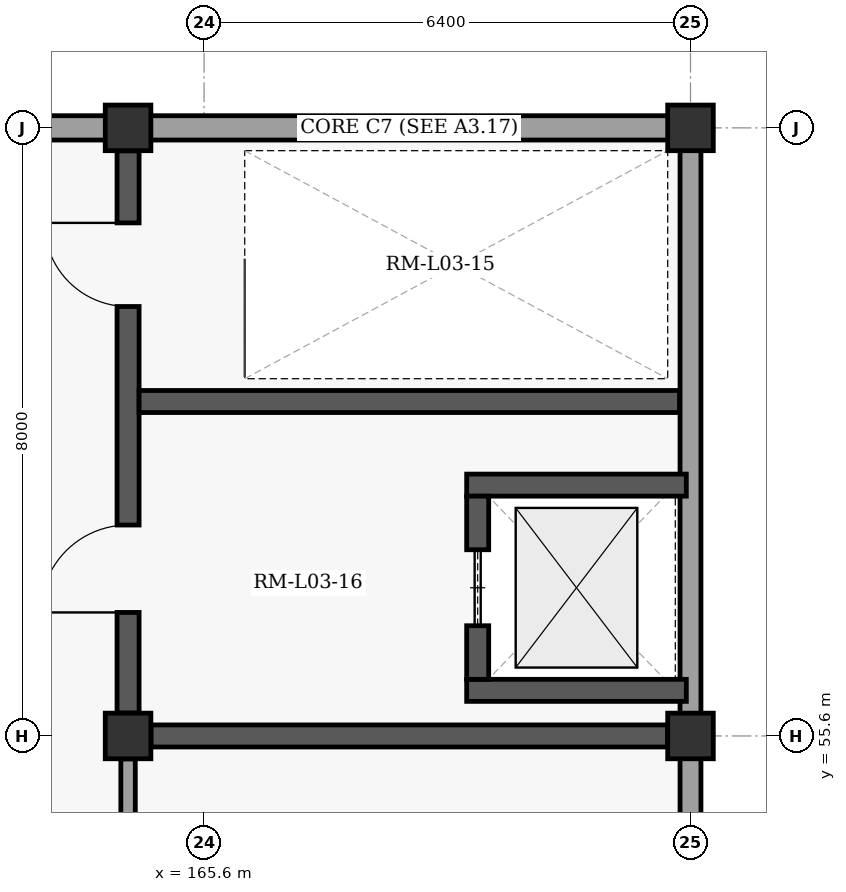
"""IFC4 building model, lengths in metres.
Left out: names, types, materials, properties, quantities, classifications, styles, units other than length and angle.
Written with IfcOpenShell. Run it as: python <this file> out.ifc"""

import sys

from ifc_helpers import new_model, si_unit, direction, frame, frame_2d, origin, origin_2d, place, context, subcontext, project, spatial, rectangle, extrude, element, fill, save


model = new_model("IFC4")
c1 = context("Model", 3, precision=1e-05, world=origin(), true_north=direction((0.0, 1.0)))
c2 = subcontext(c1, "Body", "Model", "MODEL_VIEW")
j1 = project(units=[si_unit("LENGTHUNIT", "METRE"), si_unit("PLANEANGLEUNIT", "RADIAN")], contexts=[c1])
p1 = place(None, origin())
s1 = spatial("IfcSite", under=j1, at=p1, CompositionType="ELEMENT")
p2 = place(p1, origin())
s2 = spatial("IfcBuilding", under=s1, at=p2, CompositionType="ELEMENT")
p3 = place(p2, frame((0.0, 0.0, 15.6)))
s3 = spatial("IfcBuildingStorey", under=s2, at=p3, CompositionType="ELEMENT", Elevation=15.6)
for number, where, z_axis, x_axis in (
    (1, (164.6, 55.6, 0.0), (0.0, 0.0, 1.0), (1.0, 0.0, 0.0)),
    (2, (164.6, 63.6, 0.0), (0.0, 0.0, 1.0), (1.0, 0.0, 0.0)),
    (3, (172.0, 55.6, 0.0), (0.0, 0.0, 1.0), (1.0, 0.0, 0.0)),
    (4, (172.0, 63.6, 0.0), (0.0, 0.0, 1.0), (1.0, 0.0, 0.0)),
):
    element("IfcColumn", number, at=place(p3, frame(where, z_axis=z_axis, x_axis=x_axis)), inside=s3, PredefinedType="COLUMN", context=c2, shape_type="SweptSolid", body=[
        extrude(rectangle(XDim=0.6, YDim=0.6, at=origin_2d()), origin(), (0.0, 0.0, 1.0), 4.8),
    ])
p4 = place(p3, frame((149.2, 63.6, 0.0), z_axis=(0.0, 0.0, 1.0), x_axis=(1.0, 0.0, 0.0)))
e5 = element("IfcWall", 5, at=p4, inside=s3, PredefinedType="SOLIDWALL", context=c2, shape_type="SweptSolid", body=[
    extrude(rectangle(XDim=22.8, YDim=0.32, at=frame_2d((11.4, 0.0))), origin(), (0.0, 0.0, 1.0), 3.705),
])
p5 = place(p4, frame((2.2, 0.0, 0.9)))
e6 = element("IfcOpeningElement", 6, at=p5, cuts=e5, PredefinedType="OPENING", context=c2, shape_type="SweptSolid", body=[
    extrude(rectangle(XDim=1.6, YDim=1.65, at=frame_2d((0.8, 0.825))), frame((0.0, 0.17, 0.0), z_axis=(0.0, -1.0, 0.0), x_axis=(1.0, 0.0, 0.0)), (0.0, 0.0, 1.0), 0.34),
])
p6 = place(p4, frame((8.6, 0.0, 0.9)))
e7 = element("IfcOpeningElement", 7, at=p6, cuts=e5, PredefinedType="OPENING", context=c2, shape_type="SweptSolid", body=[
    extrude(rectangle(XDim=1.6, YDim=1.65, at=frame_2d((0.8, 0.825))), frame((0.0, 0.17, 0.0), z_axis=(0.0, -1.0, 0.0), x_axis=(1.0, 0.0, 0.0)), (0.0, 0.0, 1.0), 0.34),
])
p7 = place(p3, frame((172.0, 63.6, 0.0), z_axis=(0.0, 0.0, 1.0), x_axis=(0.0, -1.0, 0.0)))
e8 = element("IfcWall", 8, at=p7, inside=s3, PredefinedType="SOLIDWALL", context=c2, shape_type="SweptSolid", body=[
    extrude(rectangle(XDim=56.0, YDim=0.275, at=frame_2d((28.0, 0.0))), origin(), (0.0, 0.0, 1.0), 3.705),
])
p8 = place(p7, frame((10.933, 0.0, 0.8)))
e9 = element("IfcOpeningElement", 9, at=p8, cuts=e8, PredefinedType="OPENING", context=c2, shape_type="SweptSolid", body=[
    extrude(rectangle(XDim=1.6, YDim=1.65, at=frame_2d((0.8, 0.825))), frame((0.0, 0.147, 0.0), z_axis=(0.0, -1.0, 0.0), x_axis=(1.0, 0.0, 0.0)), (0.0, 0.0, 1.0), 0.295),
])
p9 = place(p7, frame((19.667, 0.0, 0.8)))
e10 = element("IfcOpeningElement", 10, at=p9, cuts=e8, PredefinedType="OPENING", context=c2, shape_type="SweptSolid", body=[
    extrude(rectangle(XDim=1.6, YDim=1.65, at=frame_2d((0.8, 0.825))), frame((0.0, 0.147, 0.0), z_axis=(0.0, -1.0, 0.0), x_axis=(1.0, 0.0, 0.0)), (0.0, 0.0, 1.0), 0.295),
])
p10 = place(p7, frame((28.4, 0.0, 0.8)))
e11 = element("IfcOpeningElement", 11, at=p10, cuts=e8, PredefinedType="OPENING", context=c2, shape_type="SweptSolid", body=[
    extrude(rectangle(XDim=1.6, YDim=1.65, at=frame_2d((0.8, 0.825))), frame((0.0, 0.147, 0.0), z_axis=(0.0, -1.0, 0.0), x_axis=(1.0, 0.0, 0.0)), (0.0, 0.0, 1.0), 0.295),
])
p11 = place(p7, frame((37.133, 0.0, 0.8)))
e12 = element("IfcOpeningElement", 12, at=p11, cuts=e8, PredefinedType="OPENING", context=c2, shape_type="SweptSolid", body=[
    extrude(rectangle(XDim=1.6, YDim=1.65, at=frame_2d((0.8, 0.825))), frame((0.0, 0.147, 0.0), z_axis=(0.0, -1.0, 0.0), x_axis=(1.0, 0.0, 0.0)), (0.0, 0.0, 1.0), 0.295),
])
p12 = place(p7, frame((45.867, 0.0, 0.8)))
e13 = element("IfcOpeningElement", 13, at=p12, cuts=e8, PredefinedType="OPENING", context=c2, shape_type="SweptSolid", body=[
    extrude(rectangle(XDim=1.6, YDim=1.65, at=frame_2d((0.8, 0.825))), frame((0.0, 0.147, 0.0), z_axis=(0.0, -1.0, 0.0), x_axis=(1.0, 0.0, 0.0)), (0.0, 0.0, 1.0), 0.295),
])
p13 = place(p3, frame((164.902, 55.6, 0.0), z_axis=(0.0, 0.0, 1.0), x_axis=(1.0, 0.0, 0.0)))
e14 = element("IfcWall", 14, at=p13, inside=s3, PredefinedType="SHEAR", context=c2, shape_type="SweptSolid", body=[
    extrude(rectangle(XDim=6.796, YDim=0.29, at=frame_2d((3.398, 0.0))), origin(), (0.0, 0.0, 1.0), 4.555),
])
p14 = place(p3, frame((164.6, 55.902, 0.0), z_axis=(0.0, 0.0, 1.0), x_axis=(0.0, 1.0, 0.0)))
e15 = element("IfcWall", 15, at=p14, inside=s3, PredefinedType="SHEAR", context=c2, shape_type="SweptSolid", body=[
    extrude(rectangle(XDim=7.396, YDim=0.29, at=frame_2d((3.698, 0.0))), origin(), (0.0, 0.0, 1.0), 4.555),
])
p15 = place(p14, frame((5.348, 0.0, 0.0)))
e16 = element("IfcOpeningElement", 16, at=p15, cuts=e15, PredefinedType="OPENING", context=c2, shape_type="SweptSolid", body=[
    extrude(rectangle(XDim=1.1, YDim=2.15, at=frame_2d((0.55, 1.075))), frame((0.0, 0.155, 0.0), z_axis=(0.0, -1.0, 0.0), x_axis=(1.0, 0.0, 0.0)), (0.0, 0.0, 1.0), 0.31),
])
p16 = place(p14, frame((1.323, 0.0, 0.0)))
e17 = element("IfcOpeningElement", 17, at=p16, cuts=e15, PredefinedType="OPENING", context=c2, shape_type="SweptSolid", body=[
    extrude(rectangle(XDim=1.15, YDim=2.2, at=frame_2d((0.575, 1.1))), frame((0.0, 0.155, 0.0), z_axis=(0.0, -1.0, 0.0), x_axis=(1.0, 0.0, 0.0)), (0.0, 0.0, 1.0), 0.31),
])
p17 = place(p3, frame((164.745, 60.0, 0.0), z_axis=(0.0, 0.0, 1.0), x_axis=(1.0, 0.0, 0.0)))
e18 = element("IfcWall", 18, at=p17, inside=s3, PredefinedType="SHEAR", context=c2, shape_type="SweptSolid", body=[
    extrude(rectangle(XDim=7.11, YDim=0.29, at=frame_2d((3.555, 0.0))), origin(), (0.0, 0.0, 1.0), 4.555),
])
for number, where, z_axis, x_axis in (
    (19, (169.055, 56.2, 0.0), (0.0, 0.0, 1.0), (1.0, 0.0, 0.0)),
    (20, (169.055, 58.9, 0.0), (0.0, 0.0, 1.0), (1.0, 0.0, 0.0)),
):
    element("IfcWall", number, at=place(p3, frame(where, z_axis=z_axis, x_axis=x_axis)), inside=s3, PredefinedType="SHEAR", context=c2, shape_type="SweptSolid", body=[
        extrude(rectangle(XDim=2.89, YDim=0.29, at=frame_2d((1.445, 0.0))), origin(), (0.0, 0.0, 1.0), 4.555),
    ])
p18 = place(p3, frame((169.2, 56.345, 0.0), z_axis=(0.0, 0.0, 1.0), x_axis=(0.0, 1.0, 0.0)))
e21 = element("IfcWall", 21, at=p18, inside=s3, PredefinedType="SHEAR", context=c2, shape_type="SweptSolid", body=[
    extrude(rectangle(XDim=2.41, YDim=0.29, at=frame_2d((1.205, 0.0))), origin(), (0.0, 0.0, 1.0), 4.555),
])
p19 = place(p18, frame((0.705, 0.0, 0.0)))
e22 = element("IfcOpeningElement", 22, at=p19, cuts=e21, PredefinedType="OPENING", context=c2, shape_type="SweptSolid", body=[
    extrude(rectangle(XDim=1.0, YDim=2.15, at=frame_2d((0.5, 1.075))), frame((0.0, 0.155, 0.0), z_axis=(0.0, -1.0, 0.0), x_axis=(1.0, 0.0, 0.0)), (0.0, 0.0, 1.0), 0.31),
])
p20 = place(p3, frame((164.6, 55.298, 0.0), z_axis=(0.0, 0.0, 1.0), x_axis=(0.0, -1.0, 0.0)))
e23 = element("IfcWall", 23, at=p20, inside=s3, PredefinedType="PARTITIONING", context=c2, shape_type="SweptSolid", body=[
    extrude(rectangle(XDim=47.396, YDim=0.19, at=frame_2d((23.698, 0.0))), origin(), (0.0, 0.0, 1.0), 3.705),
])
p21 = place(p20, frame((24.18, 0.0, 0.0)))
e24 = element("IfcOpeningElement", 24, at=p21, cuts=e23, PredefinedType="OPENING", context=c2, shape_type="SweptSolid", body=[
    extrude(rectangle(XDim=1.6, YDim=2.3, at=frame_2d((0.8, 1.15))), frame((0.0, 0.105, 0.0), z_axis=(0.0, -1.0, 0.0), x_axis=(1.0, 0.0, 0.0)), (0.0, 0.0, 1.0), 0.21),
])
p22 = place(p20, frame((36.269, 0.0, 0.0)))
e25 = element("IfcOpeningElement", 25, at=p22, cuts=e23, PredefinedType="OPENING", context=c2, shape_type="SweptSolid", body=[
    extrude(rectangle(XDim=1.4, YDim=2.25, at=frame_2d((0.7, 1.125))), frame((0.0, 0.105, 0.0), z_axis=(0.0, -1.0, 0.0), x_axis=(1.0, 0.0, 0.0)), (0.0, 0.0, 1.0), 0.21),
])
p23 = place(p15, origin())
e26 = element("IfcDoor", 26, at=p23, inside=s3, OperationType="SINGLE_SWING_RIGHT", PredefinedType="DOOR", context=c2, shape_type="SweptSolid", body=[
    extrude(rectangle(XDim=1.1, YDim=2.15, at=frame_2d((0.55, 1.075))), frame((0.0, 0.025, 0.0), z_axis=(0.0, -1.0, 0.0), x_axis=(1.0, 0.0, 0.0)), (0.0, 0.0, 1.0), 0.05),
])
fill(e16, e26)
p24 = place(p16, origin())
e27 = element("IfcDoor", 27, at=p24, inside=s3, OperationType="SINGLE_SWING_LEFT", PredefinedType="DOOR", context=c2, shape_type="SweptSolid", body=[
    extrude(rectangle(XDim=1.15, YDim=2.2, at=frame_2d((0.575, 1.1))), frame((0.0, 0.025, 0.0), z_axis=(0.0, -1.0, 0.0), x_axis=(1.0, 0.0, 0.0)), (0.0, 0.0, 1.0), 0.05),
])
fill(e17, e27)
p25 = place(p19, origin())
e28 = element("IfcDoor", 28, at=p25, inside=s3, OperationType="SLIDING_TO_LEFT", PredefinedType="DOOR", context=c2, shape_type="SweptSolid", body=[
    extrude(rectangle(XDim=1.0, YDim=2.15, at=frame_2d((0.5, 1.075))), frame((0.0, 0.025, 0.0), z_axis=(0.0, -1.0, 0.0), x_axis=(1.0, 0.0, 0.0)), (0.0, 0.0, 1.0), 0.05),
])
fill(e22, e28)
save(model, sys.argv[1])
